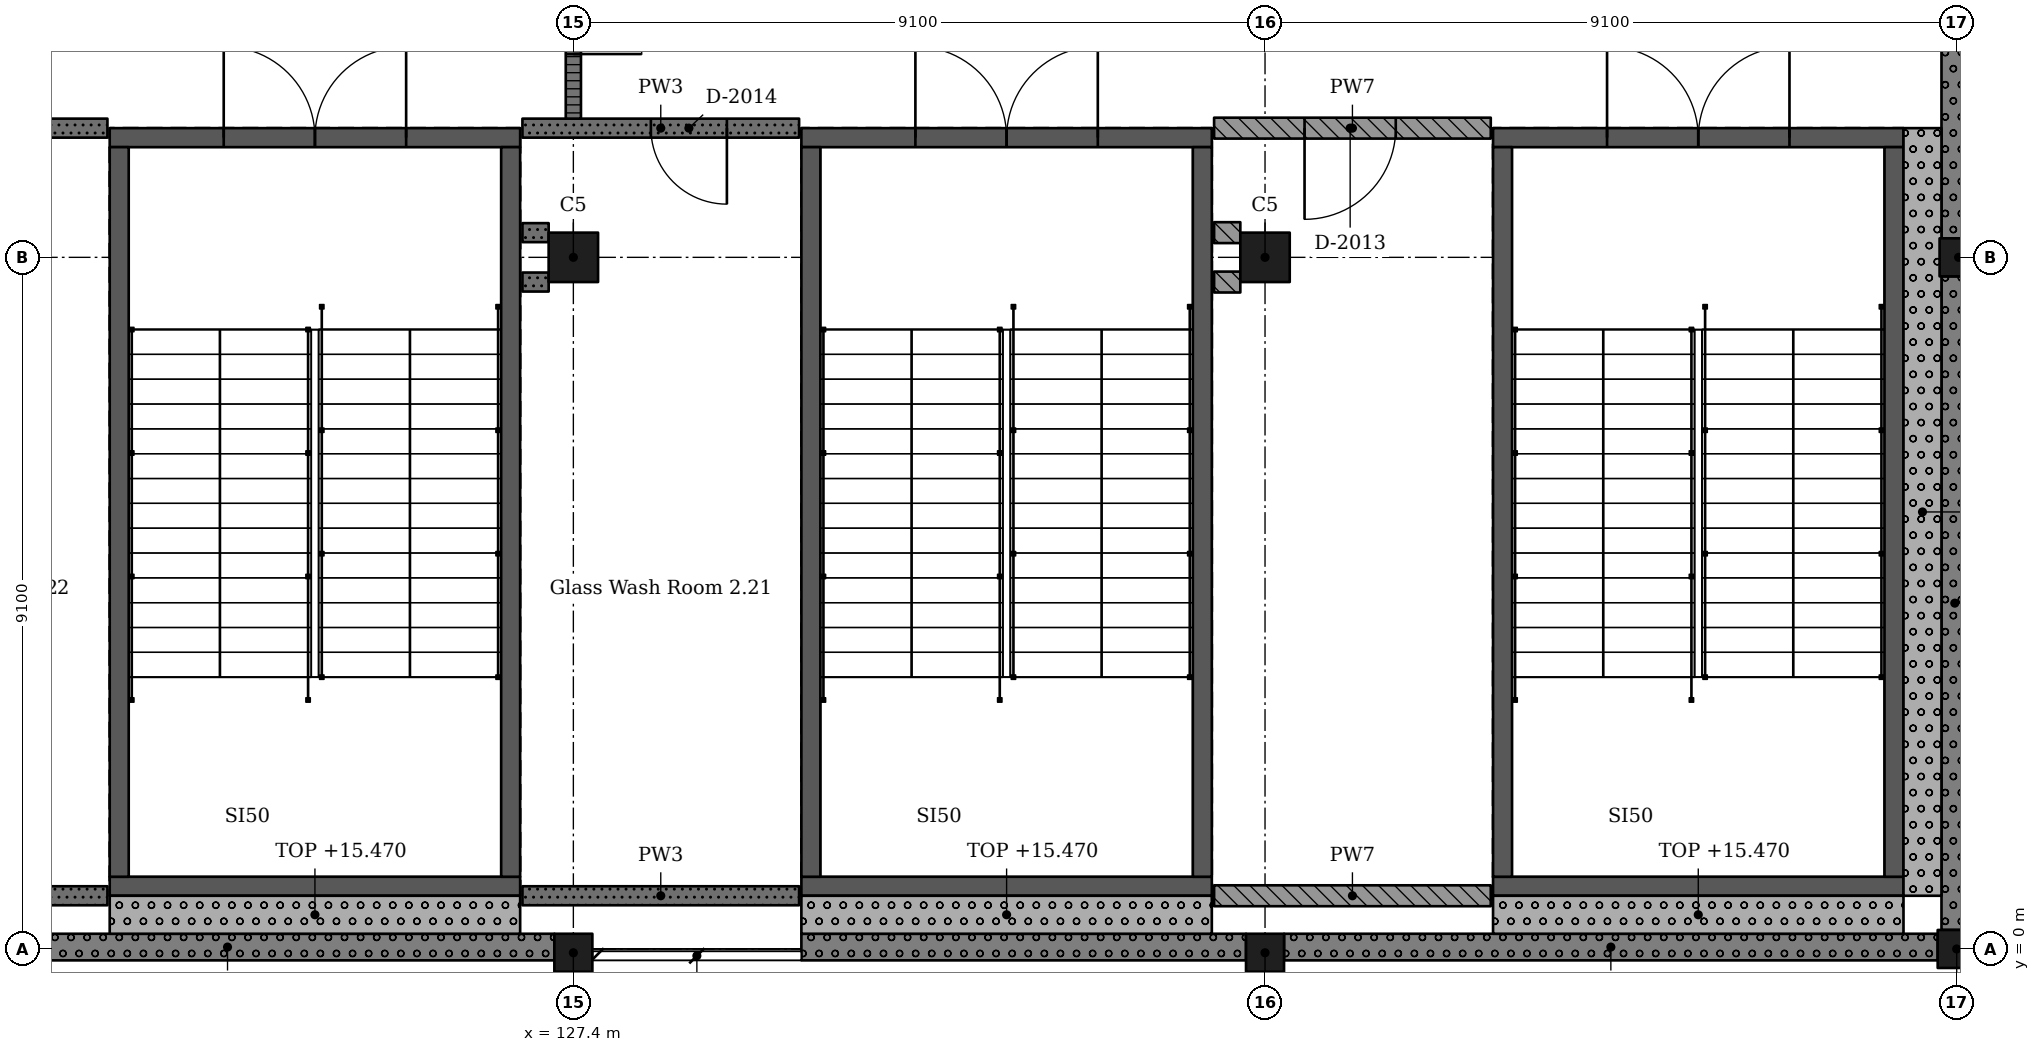
"""IFC4 building model, lengths in metres.
Left out: names, types, materials, properties, quantities, classifications, styles, units other than length and angle.
Written with IfcOpenShell. Run it as: python <this file> out.ifc"""

import sys

from ifc_helpers import new_model, si_unit, direction, frame, frame_2d, origin, origin_2d, place, context, subcontext, project, spatial, rectangle, extrude, element, fill, save


model = new_model("IFC4")
c1 = context("Model", 3, precision=1e-05, world=origin(), true_north=direction((0.0, 1.0)))
c2 = subcontext(c1, "Body", "Model", "MODEL_VIEW")
j1 = project(units=[si_unit("LENGTHUNIT", "METRE"), si_unit("PLANEANGLEUNIT", "RADIAN")], contexts=[c1])
p1 = place(None, origin())
s1 = spatial("IfcSite", under=j1, at=p1, CompositionType="ELEMENT")
p2 = place(p1, origin())
s2 = spatial("IfcBuilding", under=s1, at=p2, CompositionType="ELEMENT")
p3 = place(p2, frame((0.0, 0.0, 10.92)))
s3 = spatial("IfcBuildingStorey", under=s2, at=p3, CompositionType="ELEMENT", Elevation=10.92)
p4 = place(p3, frame((127.4, -0.05, 0.0), z_axis=(0.0, 0.0, 1.0), x_axis=(1.0, 0.0, 0.0)))
e1 = element("IfcColumn", 1, at=p4, inside=s3, PredefinedType="COLUMN", context=c2, shape_type="SweptSolid", body=[
    extrude(rectangle(XDim=0.5, YDim=0.5, at=origin_2d()), origin(), (0.0, 0.0, 1.0), 4.55),
])
p5 = place(p3, frame((127.4, 9.1, 0.0), z_axis=(0.0, 0.0, 1.0), x_axis=(1.0, 0.0, 0.0)))
e2 = element("IfcColumn", 2, at=p5, inside=s3, PredefinedType="COLUMN", context=c2, shape_type="SweptSolid", body=[
    extrude(rectangle(XDim=0.65, YDim=0.65, at=origin_2d()), origin(), (0.0, 0.0, 1.0), 4.55),
])
p6 = place(p3, frame((136.5, -0.05, 0.0), z_axis=(0.0, 0.0, 1.0), x_axis=(1.0, 0.0, 0.0)))
e3 = element("IfcColumn", 3, at=p6, inside=s3, PredefinedType="COLUMN", context=c2, shape_type="SweptSolid", body=[
    extrude(rectangle(XDim=0.5, YDim=0.5, at=origin_2d()), origin(), (0.0, 0.0, 1.0), 4.55),
])
p7 = place(p3, frame((136.5, 9.1, 0.0), z_axis=(0.0, 0.0, 1.0), x_axis=(1.0, 0.0, 0.0)))
e4 = element("IfcColumn", 4, at=p7, inside=s3, PredefinedType="COLUMN", context=c2, shape_type="SweptSolid", body=[
    extrude(rectangle(XDim=0.65, YDim=0.65, at=origin_2d()), origin(), (0.0, 0.0, 1.0), 4.55),
])
for number, where, z_axis, x_axis in (
    (5, (145.6, 0.0, 0.0), (0.0, 0.0, 1.0), (1.0, 0.0, 0.0)),
    (6, (145.625, 9.1, 0.0), (0.0, 0.0, 1.0), (1.0, 0.0, 0.0)),
):
    element("IfcColumn", number, at=place(p3, frame(where, z_axis=z_axis, x_axis=x_axis)), inside=s3, PredefinedType="COLUMN", context=c2, shape_type="SweptSolid", body=[
        extrude(rectangle(XDim=0.5, YDim=0.5, at=origin_2d()), origin(), (0.0, 0.0, 1.0), 4.55),
    ])
p8 = place(p3, frame((144.9, 0.825, 0.0), z_axis=(0.0, 0.0, 1.0), x_axis=(-1.0, 0.0, 0.0)))
e7 = element("IfcWall", 7, at=p8, inside=s3, PredefinedType="SHEAR", context=c2, shape_type="SweptSolid", body=[
    extrude(rectangle(XDim=5.4, YDim=0.25, at=frame_2d((2.7, 0.0))), origin(), (0.0, 0.0, 1.0), 4.55),
])
p9 = place(p3, frame((144.9, 10.675, 0.0), z_axis=(0.0, 0.0, 1.0), x_axis=(-1.0, 0.0, 0.0)))
e8 = element("IfcWall", 8, at=p9, inside=s3, PredefinedType="SHEAR", context=c2, shape_type="SweptSolid", body=[
    extrude(rectangle(XDim=5.4, YDim=0.25, at=frame_2d((2.7, 0.0))), origin(), (0.0, 0.0, 1.0), 4.55),
])
p10 = place(p9, frame((1.5, 0.0, 0.0)))
e9 = element("IfcOpeningElement", 9, at=p10, cuts=e8, PredefinedType="OPENING", context=c2, shape_type="SweptSolid", body=[
    extrude(rectangle(XDim=2.4, YDim=2.1, at=frame_2d((1.2, 1.05))), frame((0.0, 0.135, 0.0), z_axis=(0.0, -1.0, 0.0), x_axis=(1.0, 0.0, 0.0)), (0.0, 0.0, 1.0), 0.27),
])
for number, where, z_axis, x_axis in (
    (10, (139.625, 10.55, 0.0), (0.0, 0.0, 1.0), (0.0, -1.0, 0.0)),
    (11, (144.775, 10.55, 0.0), (0.0, 0.0, 1.0), (0.0, -1.0, 0.0)),
):
    element("IfcWall", number, at=place(p3, frame(where, z_axis=z_axis, x_axis=x_axis)), inside=s3, PredefinedType="SHEAR", context=c2, shape_type="SweptSolid", body=[
        extrude(rectangle(XDim=9.6, YDim=0.25, at=frame_2d((4.8, 0.0))), origin(), (0.0, 0.0, 1.0), 4.55),
    ])
p11 = place(p3, frame((135.8, 0.825, 0.0), z_axis=(0.0, 0.0, 1.0), x_axis=(-1.0, 0.0, 0.0)))
e12 = element("IfcWall", 12, at=p11, inside=s3, PredefinedType="SHEAR", context=c2, shape_type="SweptSolid", body=[
    extrude(rectangle(XDim=5.4, YDim=0.25, at=frame_2d((2.7, 0.0))), origin(), (0.0, 0.0, 1.0), 4.55),
])
p12 = place(p3, frame((135.8, 10.675, 0.0), z_axis=(0.0, 0.0, 1.0), x_axis=(-1.0, 0.0, 0.0)))
e13 = element("IfcWall", 13, at=p12, inside=s3, PredefinedType="SHEAR", context=c2, shape_type="SweptSolid", body=[
    extrude(rectangle(XDim=5.4, YDim=0.25, at=frame_2d((2.7, 0.0))), origin(), (0.0, 0.0, 1.0), 4.55),
])
p13 = place(p12, frame((1.5, 0.0, 0.0)))
e14 = element("IfcOpeningElement", 14, at=p13, cuts=e13, PredefinedType="OPENING", context=c2, shape_type="SweptSolid", body=[
    extrude(rectangle(XDim=2.4, YDim=2.1, at=frame_2d((1.2, 1.05))), frame((0.0, 0.135, 0.0), z_axis=(0.0, -1.0, 0.0), x_axis=(1.0, 0.0, 0.0)), (0.0, 0.0, 1.0), 0.27),
])
for number, where, z_axis, x_axis in (
    (15, (130.525, 10.55, 0.0), (0.0, 0.0, 1.0), (0.0, -1.0, 0.0)),
    (16, (135.675, 10.55, 0.0), (0.0, 0.0, 1.0), (0.0, -1.0, 0.0)),
):
    element("IfcWall", number, at=place(p3, frame(where, z_axis=z_axis, x_axis=x_axis)), inside=s3, PredefinedType="SHEAR", context=c2, shape_type="SweptSolid", body=[
        extrude(rectangle(XDim=9.6, YDim=0.25, at=frame_2d((4.8, 0.0))), origin(), (0.0, 0.0, 1.0), 4.55),
    ])
p14 = place(p3, frame((126.7, 0.825, 0.0), z_axis=(0.0, 0.0, 1.0), x_axis=(-1.0, 0.0, 0.0)))
e17 = element("IfcWall", 17, at=p14, inside=s3, PredefinedType="SHEAR", context=c2, shape_type="SweptSolid", body=[
    extrude(rectangle(XDim=5.4, YDim=0.25, at=frame_2d((2.7, 0.0))), origin(), (0.0, 0.0, 1.0), 4.55),
])
p15 = place(p3, frame((126.7, 10.675, 0.0), z_axis=(0.0, 0.0, 1.0), x_axis=(-1.0, 0.0, 0.0)))
e18 = element("IfcWall", 18, at=p15, inside=s3, PredefinedType="SHEAR", context=c2, shape_type="SweptSolid", body=[
    extrude(rectangle(XDim=5.4, YDim=0.25, at=frame_2d((2.7, 0.0))), origin(), (0.0, 0.0, 1.0), 4.55),
])
p16 = place(p15, frame((1.5, 0.0, 0.0)))
e19 = element("IfcOpeningElement", 19, at=p16, cuts=e18, PredefinedType="OPENING", context=c2, shape_type="SweptSolid", body=[
    extrude(rectangle(XDim=2.4, YDim=2.1, at=frame_2d((1.2, 1.05))), frame((0.0, 0.135, 0.0), z_axis=(0.0, -1.0, 0.0), x_axis=(1.0, 0.0, 0.0)), (0.0, 0.0, 1.0), 0.27),
])
for number, where, z_axis, x_axis in (
    (20, (121.425, 10.55, 0.0), (0.0, 0.0, 1.0), (0.0, -1.0, 0.0)),
    (21, (126.575, 10.55, 0.0), (0.0, 0.0, 1.0), (0.0, -1.0, 0.0)),
):
    element("IfcWall", number, at=place(p3, frame(where, z_axis=z_axis, x_axis=x_axis)), inside=s3, PredefinedType="SHEAR", context=c2, shape_type="SweptSolid", body=[
        extrude(rectangle(XDim=9.6, YDim=0.25, at=frame_2d((4.8, 0.0))), origin(), (0.0, 0.0, 1.0), 4.55),
    ])
p17 = place(p3, frame((118.55, 0.025, 0.0), z_axis=(0.0, 0.0, 1.0), x_axis=(1.0, 0.0, 0.0)))
e22 = element("IfcWall", 22, at=p17, inside=s3, PredefinedType="SOLIDWALL", context=c2, shape_type="SweptSolid", body=[
    extrude(rectangle(XDim=8.6, YDim=0.35, at=frame_2d((4.3, 0.0))), origin(), (0.0, 0.0, 1.0), 3.5),
])
p18 = place(p3, frame((130.4, 0.025, 0.0), z_axis=(0.0, 0.0, 1.0), x_axis=(1.0, 0.0, 0.0)))
e23 = element("IfcWall", 23, at=p18, inside=s3, PredefinedType="SOLIDWALL", context=c2, shape_type="SweptSolid", body=[
    extrude(rectangle(XDim=5.85, YDim=0.35, at=frame_2d((2.925, 0.0))), origin(), (0.0, 0.0, 1.0), 3.5),
])
for number, where, z_axis, x_axis in (
    (24, (136.75, 0.025, 0.0), (0.0, 0.0, 1.0), (1.0, 0.0, 0.0)),
    (25, (145.575, 0.25, 0.0), (0.0, 0.0, 1.0), (0.0, 1.0, 0.0)),
):
    element("IfcWall", number, at=place(p3, frame(where, z_axis=z_axis, x_axis=x_axis)), inside=s3, PredefinedType="SOLIDWALL", context=c2, shape_type="SweptSolid", body=[
        extrude(rectangle(XDim=8.6, YDim=0.35, at=frame_2d((4.3, 0.0))), origin(), (0.0, 0.0, 1.0), 3.5),
    ])
p19 = place(p3, frame((145.575, 9.35, 0.0), z_axis=(0.0, 0.0, 1.0), x_axis=(0.0, 1.0, 0.0)))
e26 = element("IfcWall", 26, at=p19, inside=s3, PredefinedType="SOLIDWALL", context=c2, shape_type="SweptSolid", body=[
    extrude(rectangle(XDim=8.575, YDim=0.35, at=frame_2d((4.288, 0.0))), origin(), (0.0, 0.0, 1.0), 3.5),
])
p20 = place(p3, frame((139.5, 0.45, 0.0), z_axis=(0.0, 0.0, 1.0), x_axis=(1.0, 0.0, 0.0)))
e27 = element("IfcWall", 27, at=p20, inside=s3, PredefinedType="SOLIDWALL", context=c2, shape_type="SweptSolid", body=[
    extrude(rectangle(XDim=5.4, YDim=0.5, at=frame_2d((2.7, 0.0))), origin(), (0.0, 0.0, 1.0), 4.55),
])
p21 = place(p3, frame((145.15, 0.7, 0.0), z_axis=(0.0, 0.0, 1.0), x_axis=(0.0, 1.0, 0.0)))
e28 = element("IfcWall", 28, at=p21, inside=s3, PredefinedType="SOLIDWALL", context=c2, shape_type="SweptSolid", body=[
    extrude(rectangle(XDim=10.1, YDim=0.5, at=frame_2d((5.05, 0.0))), origin(), (0.0, 0.0, 1.0), 4.55),
])
p22 = place(p3, frame((130.4, 0.45, 0.0), z_axis=(0.0, 0.0, 1.0), x_axis=(1.0, 0.0, 0.0)))
e29 = element("IfcWall", 29, at=p22, inside=s3, PredefinedType="SOLIDWALL", context=c2, shape_type="SweptSolid", body=[
    extrude(rectangle(XDim=5.4, YDim=0.5, at=frame_2d((2.7, 0.0))), origin(), (0.0, 0.0, 1.0), 4.55),
])
p23 = place(p3, frame((121.3, 0.45, 0.0), z_axis=(0.0, 0.0, 1.0), x_axis=(1.0, 0.0, 0.0)))
e30 = element("IfcWall", 30, at=p23, inside=s3, PredefinedType="SOLIDWALL", context=c2, shape_type="SweptSolid", body=[
    extrude(rectangle(XDim=5.4, YDim=0.5, at=frame_2d((2.7, 0.0))), origin(), (0.0, 0.0, 1.0), 4.55),
])
p24 = place(p3, frame((121.27, 0.7, 0.0), z_axis=(0.0, 0.0, 1.0), x_axis=(-1.0, 0.0, 0.0)))
e31 = element("IfcWall", 31, at=p24, inside=s3, PredefinedType="SOLIDWALL", context=c2, shape_type="SweptSolid", body=[
    extrude(rectangle(XDim=3.64, YDim=0.25, at=frame_2d((1.82, 0.0))), origin(), (0.0, 0.0, 1.0), 4.25),
])
p25 = place(p3, frame((121.27, 10.8, 0.0), z_axis=(0.0, 0.0, 1.0), x_axis=(-1.0, 0.0, 0.0)))
e32 = element("IfcWall", 32, at=p25, inside=s3, PredefinedType="SOLIDWALL", context=c2, shape_type="SweptSolid", body=[
    extrude(rectangle(XDim=3.64, YDim=0.25, at=frame_2d((1.82, 0.0))), origin(), (0.0, 0.0, 1.0), 4.25),
])
p26 = place(p25, frame((1.45, 0.0, 0.0)))
e33 = element("IfcOpeningElement", 33, at=p26, cuts=e32, PredefinedType="OPENING", context=c2, shape_type="SweptSolid", body=[
    extrude(rectangle(XDim=0.8, YDim=2.1, at=frame_2d((0.4, 1.05))), frame((0.0, 0.135, 0.0), z_axis=(0.0, -1.0, 0.0), x_axis=(1.0, 0.0, 0.0)), (0.0, 0.0, 1.0), 0.27),
])
for number, where, z_axis, x_axis in (
    (34, (126.73, 8.775, 0.0), (0.0, 0.0, 1.0), (1.0, 0.0, 0.0)),
    (35, (127.075, 9.425, 0.0), (0.0, 0.0, 1.0), (-1.0, 0.0, 0.0)),
):
    element("IfcWall", number, at=place(p3, frame(where, z_axis=z_axis, x_axis=x_axis)), inside=s3, PredefinedType="SOLIDWALL", context=c2, shape_type="SweptSolid", body=[
        extrude(rectangle(XDim=0.345, YDim=0.25, at=frame_2d((0.172, 0.0))), origin(), (0.0, 0.0, 1.0), 4.25),
    ])
p27 = place(p3, frame((126.73, 10.8, 0.0), z_axis=(0.0, 0.0, 1.0), x_axis=(1.0, 0.0, 0.0)))
e36 = element("IfcWall", 36, at=p27, inside=s3, PredefinedType="SOLIDWALL", context=c2, shape_type="SweptSolid", body=[
    extrude(rectangle(XDim=3.64, YDim=0.25, at=frame_2d((1.82, 0.0))), origin(), (0.0, 0.0, 1.0), 4.25),
])
p28 = place(p27, frame((1.69, 0.0, 0.0)))
e37 = element("IfcOpeningElement", 37, at=p28, cuts=e36, PredefinedType="OPENING", context=c2, shape_type="SweptSolid", body=[
    extrude(rectangle(XDim=1.0, YDim=2.1, at=frame_2d((0.5, 1.05))), frame((0.0, 0.135, 0.0), z_axis=(0.0, -1.0, 0.0), x_axis=(1.0, 0.0, 0.0)), (0.0, 0.0, 1.0), 0.27),
])
p29 = place(p3, frame((127.4, 10.925, 0.0), z_axis=(0.0, 0.0, 1.0), x_axis=(0.0, 1.0, 0.0)))
e38 = element("IfcWall", 38, at=p29, inside=s3, PredefinedType="PARTITIONING", context=c2, shape_type="SweptSolid", body=[
    extrude(rectangle(XDim=6.9, YDim=0.2, at=frame_2d((3.45, 0.0))), origin(), (0.0, 0.0, 1.0), 3.55),
])
p30 = place(p29, frame((0.85, 0.0, 0.0)))
e39 = element("IfcOpeningElement", 39, at=p30, cuts=e38, PredefinedType="OPENING", context=c2, shape_type="SweptSolid", body=[
    extrude(rectangle(XDim=1.8, YDim=2.4, at=frame_2d((0.9, 1.2))), frame((0.0, 0.11, 0.0), z_axis=(0.0, -1.0, 0.0), x_axis=(1.0, 0.0, 0.0)), (0.0, 0.0, 1.0), 0.22),
])
p31 = place(p29, frame((4.25, 0.0, 0.0)))
e40 = element("IfcOpeningElement", 40, at=p31, cuts=e38, PredefinedType="OPENING", context=c2, shape_type="SweptSolid", body=[
    extrude(rectangle(XDim=1.8, YDim=2.4, at=frame_2d((0.9, 1.2))), frame((0.0, 0.11, 0.0), z_axis=(0.0, -1.0, 0.0), x_axis=(1.0, 0.0, 0.0)), (0.0, 0.0, 1.0), 0.22),
])
p32 = place(p3, frame((130.37, 0.7, 0.0), z_axis=(0.0, 0.0, 1.0), x_axis=(-1.0, 0.0, 0.0)))
e41 = element("IfcWall", 41, at=p32, inside=s3, PredefinedType="SOLIDWALL", context=c2, shape_type="SweptSolid", body=[
    extrude(rectangle(XDim=3.64, YDim=0.25, at=frame_2d((1.82, 0.0))), origin(), (0.0, 0.0, 1.0), 4.25),
])
for number, where, z_axis, x_axis in (
    (42, (135.83, 8.775, 0.0), (0.0, 0.0, 1.0), (1.0, 0.0, 0.0)),
    (43, (136.175, 9.425, 0.0), (0.0, 0.0, 1.0), (-1.0, 0.0, 0.0)),
):
    element("IfcWall", number, at=place(p3, frame(where, z_axis=z_axis, x_axis=x_axis)), inside=s3, PredefinedType="SOLIDWALL", context=c2, shape_type="SweptSolid", body=[
        extrude(rectangle(XDim=0.345, YDim=0.275, at=frame_2d((0.172, 0.0))), origin(), (0.0, 0.0, 1.0), 4.25),
    ])
p33 = place(p3, frame((139.47, 0.7, 0.0), z_axis=(0.0, 0.0, 1.0), x_axis=(-1.0, 0.0, 0.0)))
e44 = element("IfcWall", 44, at=p33, inside=s3, PredefinedType="SOLIDWALL", context=c2, shape_type="SweptSolid", body=[
    extrude(rectangle(XDim=3.64, YDim=0.275, at=frame_2d((1.82, 0.0))), origin(), (0.0, 0.0, 1.0), 4.25),
])
p34 = place(p3, frame((139.47, 10.8, 0.0), z_axis=(0.0, 0.0, 1.0), x_axis=(-1.0, 0.0, 0.0)))
e45 = element("IfcWall", 45, at=p34, inside=s3, PredefinedType="SOLIDWALL", context=c2, shape_type="SweptSolid", body=[
    extrude(rectangle(XDim=3.64, YDim=0.275, at=frame_2d((1.82, 0.0))), origin(), (0.0, 0.0, 1.0), 4.25),
])
p35 = place(p34, frame((1.25, 0.0, 0.0)))
e46 = element("IfcOpeningElement", 46, at=p35, cuts=e45, PredefinedType="OPENING", context=c2, shape_type="SweptSolid", body=[
    extrude(rectangle(XDim=1.2, YDim=2.4, at=frame_2d((0.6, 1.2))), frame((0.0, 0.147, 0.0), z_axis=(0.0, -1.0, 0.0), x_axis=(1.0, 0.0, 0.0)), (0.0, 0.0, 1.0), 0.295),
])
p36 = place(p35, origin())
e47 = element("IfcDoor", 47, at=p36, inside=s3, OperationType="SINGLE_SWING_LEFT", PredefinedType="DOOR", context=c2, shape_type="SweptSolid", body=[
    extrude(rectangle(XDim=1.2, YDim=2.4, at=frame_2d((0.6, 1.2))), frame((0.0, 0.025, 0.0), z_axis=(0.0, -1.0, 0.0), x_axis=(1.0, 0.0, 0.0)), (0.0, 0.0, 1.0), 0.05),
])
fill(e46, e47)
p37 = place(p28, origin())
e48 = element("IfcDoor", 48, at=p37, inside=s3, OperationType="SINGLE_SWING_RIGHT", PredefinedType="DOOR", context=c2, shape_type="SweptSolid", body=[
    extrude(rectangle(XDim=1.0, YDim=2.1, at=frame_2d((0.5, 1.05))), frame((0.0, 0.025, 0.0), z_axis=(0.0, -1.0, 0.0), x_axis=(1.0, 0.0, 0.0)), (0.0, 0.0, 1.0), 0.05),
])
fill(e37, e48)
p38 = place(p30, origin())
e49 = element("IfcDoor", 49, at=p38, inside=s3, OperationType="DOUBLE_DOOR_SINGLE_SWING", PredefinedType="DOOR", context=c2, shape_type="SweptSolid", body=[
    extrude(rectangle(XDim=1.8, YDim=2.4, at=frame_2d((0.9, 1.2))), frame((0.0, 0.025, 0.0), z_axis=(0.0, -1.0, 0.0), x_axis=(1.0, 0.0, 0.0)), (0.0, 0.0, 1.0), 0.05),
])
fill(e39, e49)
p39 = place(p10, origin())
e50 = element("IfcDoor", 50, at=p39, inside=s3, OperationType="DOUBLE_DOOR_SINGLE_SWING", PredefinedType="DOOR", context=c2, shape_type="SweptSolid", body=[
    extrude(rectangle(XDim=2.4, YDim=2.1, at=frame_2d((1.2, 1.05))), frame((0.0, 0.025, 0.0), z_axis=(0.0, -1.0, 0.0), x_axis=(1.0, 0.0, 0.0)), (0.0, 0.0, 1.0), 0.05),
])
fill(e9, e50)
p40 = place(p13, origin())
e51 = element("IfcDoor", 51, at=p40, inside=s3, OperationType="DOUBLE_DOOR_SINGLE_SWING", PredefinedType="DOOR", context=c2, shape_type="SweptSolid", body=[
    extrude(rectangle(XDim=2.4, YDim=2.1, at=frame_2d((1.2, 1.05))), frame((0.0, 0.025, 0.0), z_axis=(0.0, -1.0, 0.0), x_axis=(1.0, 0.0, 0.0)), (0.0, 0.0, 1.0), 0.05),
])
fill(e14, e51)
p41 = place(p16, origin())
e52 = element("IfcDoor", 52, at=p41, inside=s3, OperationType="DOUBLE_DOOR_SINGLE_SWING", PredefinedType="DOOR", context=c2, shape_type="SweptSolid", body=[
    extrude(rectangle(XDim=2.4, YDim=2.1, at=frame_2d((1.2, 1.05))), frame((0.0, 0.025, 0.0), z_axis=(0.0, -1.0, 0.0), x_axis=(1.0, 0.0, 0.0)), (0.0, 0.0, 1.0), 0.05),
])
fill(e19, e52)
save(model, sys.argv[1])
